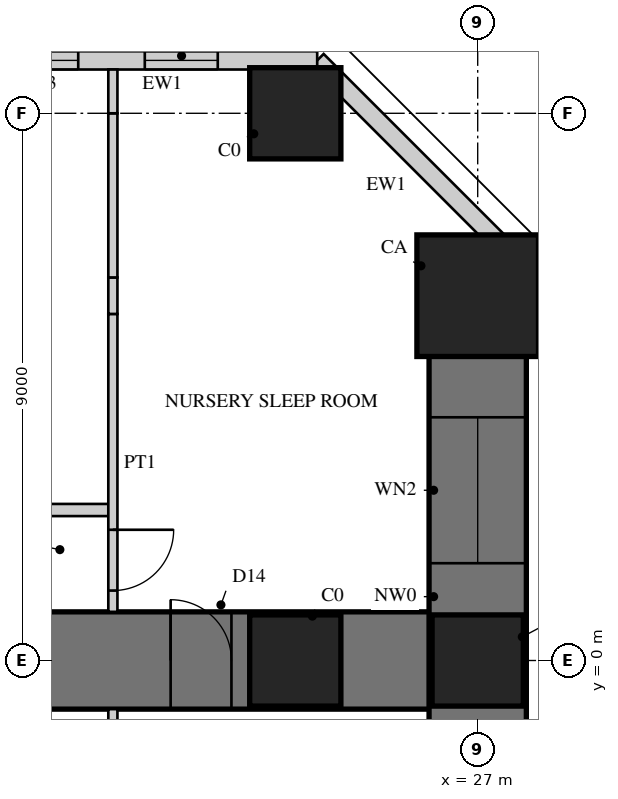
"""IFC4 building model, lengths in metres.
Left out: names, types, materials, properties, quantities, classifications, styles, units other than length and angle.
Written with IfcOpenShell. Run it as: python <this file> out.ifc"""

import sys

from ifc_helpers import new_model, si_unit, direction, frame, frame_2d, origin, origin_2d, place, context, subcontext, project, spatial, rectangle, hollow_rectangle, extrude, element, fill, save


model = new_model("IFC4")
c1 = context("Model", 3, precision=1e-05, world=origin(), true_north=direction((0.0, 1.0)))
c2 = subcontext(c1, "Body", "Model", "MODEL_VIEW")
j1 = project(units=[si_unit("LENGTHUNIT", "METRE"), si_unit("PLANEANGLEUNIT", "RADIAN")], contexts=[c1])
p1 = place(None, origin())
s1 = spatial("IfcSite", under=j1, at=p1, CompositionType="ELEMENT")
p2 = place(p1, origin())
s2 = spatial("IfcBuilding", under=s1, at=p2, CompositionType="ELEMENT")
p3 = place(p2, origin())
s3 = spatial("IfcBuildingStorey", under=s2, at=p3, CompositionType="ELEMENT", Elevation=0.0)
p4 = place(p3, frame((9.0, 0.0, 0.0), z_axis=(0.0, 0.0, 1.0), x_axis=(1.0, 0.0, 0.0)))
e1 = element("IfcWall", 1, at=p4, inside=s3, PredefinedType="SHEAR", context=c2, shape_type="SweptSolid", body=[
    extrude(rectangle(XDim=18.0, YDim=1.6, at=frame_2d((9.0, 0.0))), origin(), (0.0, 0.0, 1.0), 5.0),
])
p5 = place(p4, frame((1.85, 0.0, 0.0)))
e2 = element("IfcOpeningElement", 2, at=p5, cuts=e1, PredefinedType="OPENING", context=c2, shape_type="SweptSolid", body=[
    extrude(rectangle(XDim=1.0, YDim=2.2, at=frame_2d((0.5, 1.1))), frame((0.0, 0.81, 0.0), z_axis=(0.0, -1.0, 0.0), x_axis=(1.0, 0.0, 0.0)), (0.0, 0.0, 1.0), 1.62),
])
p6 = place(p4, frame((7.2, 0.0, 0.0)))
e3 = element("IfcOpeningElement", 3, at=p6, cuts=e1, PredefinedType="OPENING", context=c2, shape_type="SweptSolid", body=[
    extrude(rectangle(XDim=1.0, YDim=2.2, at=frame_2d((0.5, 1.1))), frame((0.0, 0.81, 0.0), z_axis=(0.0, -1.0, 0.0), x_axis=(1.0, 0.0, 0.0)), (0.0, 0.0, 1.0), 1.62),
])
p7 = place(p4, frame((12.95, 0.0, 0.0)))
e4 = element("IfcOpeningElement", 4, at=p7, cuts=e1, PredefinedType="OPENING", context=c2, shape_type="SweptSolid", body=[
    extrude(rectangle(XDim=1.0, YDim=2.2, at=frame_2d((0.5, 1.1))), frame((0.0, 0.81, 0.0), z_axis=(0.0, -1.0, 0.0), x_axis=(1.0, 0.0, 0.0)), (0.0, 0.0, 1.0), 1.62),
])
p8 = place(p3, frame((27.0, -6.0, 0.0), z_axis=(0.0, 0.0, 1.0), x_axis=(0.0, 1.0, 0.0)))
e5 = element("IfcWall", 5, at=p8, inside=s3, PredefinedType="SHEAR", context=c2, shape_type="SweptSolid", body=[
    extrude(rectangle(XDim=12.0, YDim=1.6, at=frame_2d((6.0, 0.0))), origin(), (0.0, 0.0, 1.0), 5.0),
])
p9 = place(p8, frame((2.75, 0.0, 0.0)))
e6 = element("IfcOpeningElement", 6, at=p9, cuts=e5, PredefinedType="OPENING", context=c2, shape_type="SweptSolid", body=[
    extrude(rectangle(XDim=2.0, YDim=2.6, at=frame_2d((1.0, 1.3))), frame((0.0, 0.81, 0.0), z_axis=(0.0, -1.0, 0.0), x_axis=(1.0, 0.0, 0.0)), (0.0, 0.0, 1.0), 1.62),
])
p10 = place(p8, frame((7.6, 0.0, 0.6)))
e7 = element("IfcOpeningElement", 7, at=p10, cuts=e5, PredefinedType="OPENING", context=c2, shape_type="SweptSolid", body=[
    extrude(rectangle(XDim=2.4, YDim=3.0, at=frame_2d((1.2, 1.5))), frame((0.0, 0.81, 0.0), z_axis=(0.0, -1.0, 0.0), x_axis=(1.0, 0.0, 0.0)), (0.0, 0.0, 1.0), 1.62),
])
for number, where, z_axis, x_axis in (
    (8, (24.0, 9.0, 0.0), (0.0, 0.0, 1.0), (1.0, 0.0, 0.0)),
    (9, (27.0, 0.0, 0.0), (0.0, 0.0, 1.0), (1.0, 0.0, 0.0)),
):
    element("IfcColumn", number, at=place(p3, frame(where, z_axis=z_axis, x_axis=x_axis)), inside=s3, PredefinedType="COLUMN", context=c2, shape_type="SweptSolid", body=[
        extrude(rectangle(XDim=1.5, YDim=1.5, at=origin_2d()), origin(), (0.0, 0.0, 1.0), 5.0),
    ])
p11 = place(p3, frame((27.0, 6.0, 0.0), z_axis=(0.0, 0.0, 1.0), x_axis=(1.0, 0.0, 0.0)))
e10 = element("IfcColumn", 10, at=p11, inside=s3, PredefinedType="COLUMN", context=c2, shape_type="SweptSolid", body=[
    extrude(rectangle(XDim=2.0, YDim=2.0, at=origin_2d()), origin(), (0.0, 0.0, 1.0), 5.0),
])
p12 = place(p3, frame((24.0, 0.0, 0.0), z_axis=(0.0, 0.0, 1.0), x_axis=(1.0, 0.0, 0.0)))
e11 = element("IfcColumn", 11, at=p12, inside=s3, PredefinedType="COLUMN", context=c2, shape_type="SweptSolid", body=[
    extrude(rectangle(XDim=1.5, YDim=1.5, at=origin_2d()), origin(), (0.0, 0.0, 1.0), 5.0),
])
p13 = place(p3, frame((27.8, 6.43, 0.0), z_axis=(0.0, 0.0, 1.0), x_axis=(-0.707106781187, 0.707106781187, 0.0)))
e12 = element("IfcWall", 12, at=p13, inside=s3, PredefinedType="SOLIDWALL", context=c2, shape_type="SweptSolid", body=[
    extrude(rectangle(XDim=4.865, YDim=0.3, at=frame_2d((2.432, 0.0))), origin(), (0.0, 0.0, 1.0), 4.8),
])
p14 = place(p3, frame((24.36, 9.87, 0.0), z_axis=(0.0, 0.0, 1.0), x_axis=(-1.0, 0.0, 0.0)))
e13 = element("IfcWall", 13, at=p14, inside=s3, PredefinedType="SOLIDWALL", context=c2, shape_type="SweptSolid", body=[
    extrude(rectangle(XDim=6.0, YDim=0.3, at=frame_2d((3.0, 0.0))), origin(), (0.0, 0.0, 1.0), 4.8),
])
p15 = place(p14, frame((1.635, 0.0, 0.3)))
e14 = element("IfcOpeningElement", 14, at=p15, cuts=e13, PredefinedType="OPENING", context=c2, shape_type="SweptSolid", body=[
    extrude(rectangle(XDim=1.2, YDim=3.9, at=frame_2d((0.6, 1.95))), frame((0.0, 0.16, 0.0), z_axis=(0.0, -1.0, 0.0), x_axis=(1.0, 0.0, 0.0)), (0.0, 0.0, 1.0), 0.32),
])
p16 = place(p14, frame((3.93, 0.0, 0.3)))
e15 = element("IfcOpeningElement", 15, at=p16, cuts=e13, PredefinedType="OPENING", context=c2, shape_type="SweptSolid", body=[
    extrude(rectangle(XDim=1.2, YDim=3.9, at=frame_2d((0.6, 1.95))), frame((0.0, 0.16, 0.0), z_axis=(0.0, -1.0, 0.0), x_axis=(1.0, 0.0, 0.0)), (0.0, 0.0, 1.0), 0.32),
])
p17 = place(p3, frame((9.65, 2.475, 0.0), z_axis=(0.0, 0.0, 1.0), x_axis=(1.0, 0.0, 0.0)))
e16 = element("IfcWall", 16, at=p17, inside=s3, PredefinedType="SOLIDWALL", context=c2, shape_type="SweptSolid", body=[
    extrude(rectangle(XDim=11.35, YDim=0.2, at=frame_2d((5.675, 0.0))), origin(), (0.0, 0.0, 1.0), 4.8),
])
p18 = place(p17, frame((1.2, 0.0, 0.0)))
e17 = element("IfcOpeningElement", 17, at=p18, cuts=e16, PredefinedType="OPENING", context=c2, shape_type="SweptSolid", body=[
    extrude(rectangle(XDim=1.0, YDim=2.2, at=frame_2d((0.5, 1.1))), frame((0.0, 0.11, 0.0), z_axis=(0.0, -1.0, 0.0), x_axis=(1.0, 0.0, 0.0)), (0.0, 0.0, 1.0), 0.22),
])
p19 = place(p17, frame((3.6, 0.0, 0.0)))
e18 = element("IfcOpeningElement", 18, at=p19, cuts=e16, PredefinedType="OPENING", context=c2, shape_type="SweptSolid", body=[
    extrude(rectangle(XDim=1.0, YDim=2.2, at=frame_2d((0.5, 1.1))), frame((0.0, 0.11, 0.0), z_axis=(0.0, -1.0, 0.0), x_axis=(1.0, 0.0, 0.0)), (0.0, 0.0, 1.0), 0.22),
])
p20 = place(p17, frame((6.55, 0.0, 0.0)))
e19 = element("IfcOpeningElement", 19, at=p20, cuts=e16, PredefinedType="OPENING", context=c2, shape_type="SweptSolid", body=[
    extrude(rectangle(XDim=1.0, YDim=2.2, at=frame_2d((0.5, 1.1))), frame((0.0, 0.11, 0.0), z_axis=(0.0, -1.0, 0.0), x_axis=(1.0, 0.0, 0.0)), (0.0, 0.0, 1.0), 0.22),
])
p21 = place(p3, frame((21.0, -5.7, 0.0), z_axis=(0.0, 0.0, 1.0), x_axis=(0.0, 1.0, 0.0)))
e20 = element("IfcWall", 20, at=p21, inside=s3, PredefinedType="PARTITIONING", context=c2, shape_type="SweptSolid", body=[
    extrude(rectangle(XDim=4.9, YDim=0.15, at=frame_2d((2.45, 0.0))), origin(), (0.0, 0.0, 1.0), 3.85),
])
p22 = place(p3, frame((21.0, 0.8, 0.0), z_axis=(0.0, 0.0, 1.0), x_axis=(0.0, 1.0, 0.0)))
e21 = element("IfcWall", 21, at=p22, inside=s3, PredefinedType="PARTITIONING", context=c2, shape_type="SweptSolid", body=[
    extrude(rectangle(XDim=4.9, YDim=0.15, at=frame_2d((2.45, 0.0))), origin(), (0.0, 0.0, 1.0), 3.85),
])
p23 = place(p22, frame((0.35, 0.0, 0.0)))
e22 = element("IfcOpeningElement", 22, at=p23, cuts=e21, PredefinedType="OPENING", context=c2, shape_type="SweptSolid", body=[
    extrude(rectangle(XDim=1.0, YDim=2.2, at=frame_2d((0.5, 1.1))), frame((0.0, 0.085, 0.0), z_axis=(0.0, -1.0, 0.0), x_axis=(1.0, 0.0, 0.0)), (0.0, 0.0, 1.0), 0.17),
])
p24 = place(p3, frame((21.0, 5.7, 0.0), z_axis=(0.0, 0.0, 1.0), x_axis=(0.0, 1.0, 0.0)))
e23 = element("IfcWall", 23, at=p24, inside=s3, PredefinedType="PARTITIONING", context=c2, shape_type="SweptSolid", body=[
    extrude(rectangle(XDim=0.6, YDim=0.15, at=frame_2d((0.3, 0.0))), origin(), (0.0, 0.0, 1.0), 4.8),
])
p25 = place(p3, frame((21.0, 6.3, 0.0), z_axis=(0.0, 0.0, 1.0), x_axis=(0.0, 1.0, 0.0)))
e24 = element("IfcWall", 24, at=p25, inside=s3, PredefinedType="PARTITIONING", context=c2, shape_type="SweptSolid", body=[
    extrude(rectangle(XDim=2.7, YDim=0.15, at=frame_2d((1.35, 0.0))), origin(), (0.0, 0.0, 1.0), 3.85),
])
p26 = place(p3, frame((21.0, 9.0, 0.0), z_axis=(0.0, 0.0, 1.0), x_axis=(0.0, 1.0, 0.0)))
e25 = element("IfcWall", 25, at=p26, inside=s3, PredefinedType="PARTITIONING", context=c2, shape_type="SweptSolid", body=[
    extrude(rectangle(XDim=0.72, YDim=0.15, at=frame_2d((0.36, 0.0))), origin(), (0.0, 0.0, 1.0), 4.8),
])
p27 = place(p10, origin())
e26 = element("IfcWindow", 26, at=p27, inside=s3, PartitioningType="SINGLE_PANEL", PredefinedType="WINDOW", context=c2, shape_type="SweptSolid", body=[
    extrude(hollow_rectangle(XDim=2.4, YDim=3.0, WallThickness=0.06, at=frame_2d((1.2, 1.5))), frame((0.0, 0.03, 0.0), z_axis=(0.0, -1.0, 0.0), x_axis=(1.0, 0.0, 0.0)), (0.0, 0.0, 1.0), 0.06),
    extrude(rectangle(XDim=2.279, YDim=2.879, at=frame_2d((1.2, 1.5))), frame((0.0, 0.03, 0.0), z_axis=(0.0, -1.0, 0.0), x_axis=(1.0, 0.0, 0.0)), (0.0, 0.0, 1.0), 0.06),
])
fill(e7, e26)
p28 = place(p15, origin())
e27 = element("IfcWindow", 27, at=p28, inside=s3, PartitioningType="SINGLE_PANEL", PredefinedType="WINDOW", context=c2, shape_type="SweptSolid", body=[
    extrude(hollow_rectangle(XDim=1.2, YDim=3.9, WallThickness=0.06, at=frame_2d((0.6, 1.95))), frame((0.0, 0.03, 0.0), z_axis=(0.0, -1.0, 0.0), x_axis=(1.0, 0.0, 0.0)), (0.0, 0.0, 1.0), 0.06),
    extrude(rectangle(XDim=1.079, YDim=3.779, at=frame_2d((0.6, 1.95))), frame((0.0, 0.03, 0.0), z_axis=(0.0, -1.0, 0.0), x_axis=(1.0, 0.0, 0.0)), (0.0, 0.0, 1.0), 0.06),
])
fill(e14, e27)
p29 = place(p16, origin())
e28 = element("IfcWindow", 28, at=p29, inside=s3, PartitioningType="SINGLE_PANEL", PredefinedType="WINDOW", context=c2, shape_type="SweptSolid", body=[
    extrude(hollow_rectangle(XDim=1.2, YDim=3.9, WallThickness=0.06, at=frame_2d((0.6, 1.95))), frame((0.0, 0.03, 0.0), z_axis=(0.0, -1.0, 0.0), x_axis=(1.0, 0.0, 0.0)), (0.0, 0.0, 1.0), 0.06),
    extrude(rectangle(XDim=1.079, YDim=3.779, at=frame_2d((0.6, 1.95))), frame((0.0, 0.03, 0.0), z_axis=(0.0, -1.0, 0.0), x_axis=(1.0, 0.0, 0.0)), (0.0, 0.0, 1.0), 0.06),
])
fill(e15, e28)
p30 = place(p23, frame((1.0, 0.0, 0.0), z_axis=(0.0, 0.0, 1.0), x_axis=(-1.0, 0.0, 0.0)))
e29 = element("IfcDoor", 29, at=p30, inside=s3, OperationType="SINGLE_SWING_LEFT", PredefinedType="DOOR", context=c2, shape_type="SweptSolid", body=[
    extrude(rectangle(XDim=1.0, YDim=2.2, at=frame_2d((0.5, 1.1))), frame((0.0, 0.025, 0.0), z_axis=(0.0, -1.0, 0.0), x_axis=(1.0, 0.0, 0.0)), (0.0, 0.0, 1.0), 0.05),
])
fill(e22, e29)
p31 = place(p7, origin())
e30 = element("IfcDoor", 30, at=p31, inside=s3, OperationType="SINGLE_SWING_LEFT", PredefinedType="DOOR", context=c2, shape_type="SweptSolid", body=[
    extrude(rectangle(XDim=1.0, YDim=2.2, at=frame_2d((0.5, 1.1))), frame((0.0, 0.025, 0.0), z_axis=(0.0, -1.0, 0.0), x_axis=(1.0, 0.0, 0.0)), (0.0, 0.0, 1.0), 0.05),
])
fill(e4, e30)
save(model, sys.argv[1])
